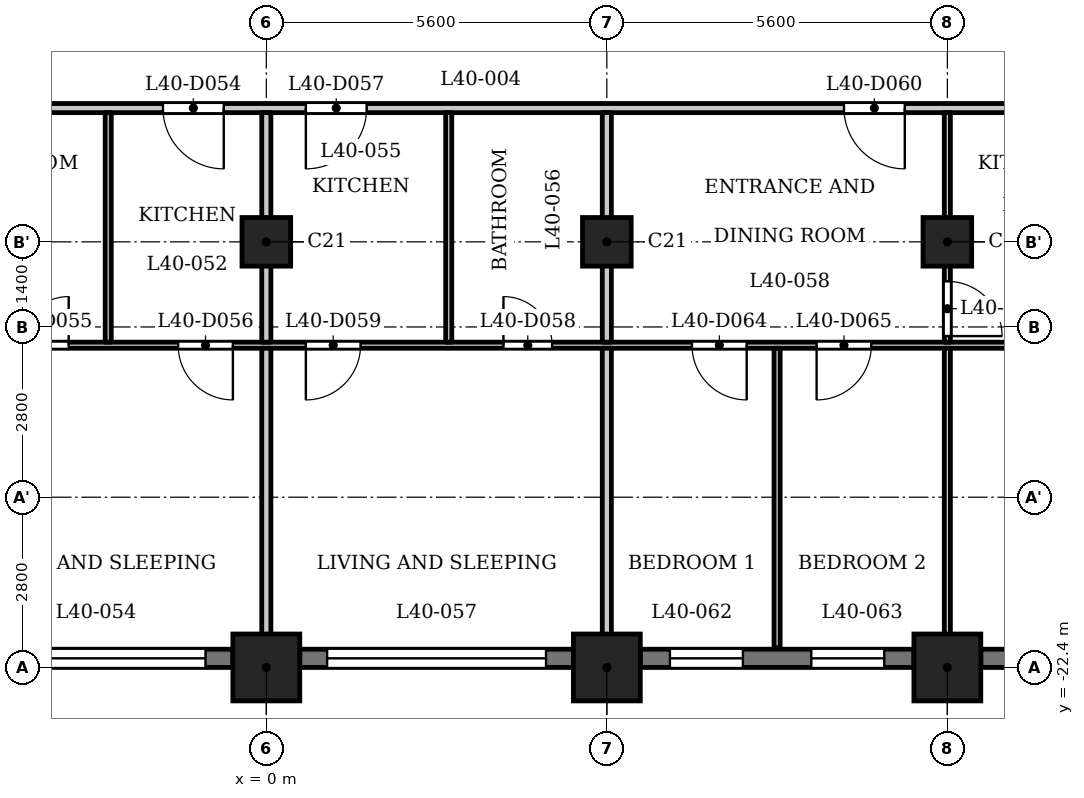
"""IFC4 building model, lengths in metres.
Left out: names, types, materials, properties, quantities, classifications, styles, units other than length and angle.
Written with IfcOpenShell. Run it as: python <this file> out.ifc"""

import sys

from ifc_helpers import new_model, si_unit, direction, frame, frame_2d, origin, origin_2d, place, context, subcontext, project, spatial, rectangle, extrude, element, fill, save


model = new_model("IFC4")
c1 = context("Model", 3, precision=1e-05, world=origin(), true_north=direction((0.0, 1.0)))
c2 = subcontext(c1, "Body", "Model", "MODEL_VIEW")
j1 = project(units=[si_unit("LENGTHUNIT", "METRE"), si_unit("PLANEANGLEUNIT", "RADIAN")], contexts=[c1])
p1 = place(None, origin())
s1 = spatial("IfcSite", under=j1, at=p1, CompositionType="ELEMENT")
p2 = place(p1, origin())
s2 = spatial("IfcBuilding", under=s1, at=p2, CompositionType="ELEMENT")
p3 = place(p2, frame((0.0, 0.0, 157.1)))
s3 = spatial("IfcBuildingStorey", under=s2, at=p3, CompositionType="ELEMENT", Elevation=157.1)
for number, where, z_axis, x_axis in (
    (1, (0.0, -22.4, 0.0), (0.0, 0.0, 1.0), (1.0, 0.0, 0.0)),
    (2, (5.6, -22.4, 0.0), (0.0, 0.0, 1.0), (1.0, 0.0, 0.0)),
    (3, (11.2, -22.4, 0.0), (0.0, 0.0, 1.0), (1.0, 0.0, 0.0)),
):
    element("IfcColumn", number, at=place(p3, frame(where, z_axis=z_axis, x_axis=x_axis)), inside=s3, PredefinedType="COLUMN", context=c2, shape_type="SweptSolid", body=[
        extrude(rectangle(XDim=1.1, YDim=1.1, at=origin_2d()), origin(), (0.0, 0.0, 1.0), 3.5),
    ])
for number, where, z_axis, x_axis in (
    (4, (0.0, -15.4, 0.0), (0.0, 0.0, 1.0), (1.0, 0.0, 0.0)),
    (5, (5.6, -15.4, 0.0), (0.0, 0.0, 1.0), (1.0, 0.0, 0.0)),
    (6, (11.2, -15.4, 0.0), (0.0, 0.0, 1.0), (1.0, 0.0, 0.0)),
):
    element("IfcColumn", number, at=place(p3, frame(where, z_axis=z_axis, x_axis=x_axis)), inside=s3, PredefinedType="COLUMN", context=c2, shape_type="SweptSolid", body=[
        extrude(rectangle(XDim=0.8, YDim=0.8, at=origin_2d()), origin(), (0.0, 0.0, 1.0), 3.5),
    ])
p4 = place(p3, frame((-5.05, -22.25, 0.0), z_axis=(0.0, 0.0, 1.0), x_axis=(1.0, 0.0, 0.0)))
e7 = element("IfcWall", 7, at=p4, inside=s3, PredefinedType="SOLIDWALL", context=c2, shape_type="SweptSolid", body=[
    extrude(rectangle(XDim=4.5, YDim=0.3, at=frame_2d((2.25, 0.0))), origin(), (0.0, 0.0, 1.0), 2.45),
])
p5 = place(p4, frame((0.45, 0.0, 1.2)))
e8 = element("IfcOpeningElement", 8, at=p5, cuts=e7, PredefinedType="OPENING", context=c2, shape_type="SweptSolid", body=[
    extrude(rectangle(XDim=3.6, YDim=0.95, at=frame_2d((1.8, 0.475))), frame((0.0, 0.16, 0.0), z_axis=(0.0, -1.0, 0.0), x_axis=(1.0, 0.0, 0.0)), (0.0, 0.0, 1.0), 0.32),
])
p6 = place(p3, frame((0.55, -22.25, 0.0), z_axis=(0.0, 0.0, 1.0), x_axis=(1.0, 0.0, 0.0)))
e9 = element("IfcWall", 9, at=p6, inside=s3, PredefinedType="SOLIDWALL", context=c2, shape_type="SweptSolid", body=[
    extrude(rectangle(XDim=4.5, YDim=0.3, at=frame_2d((2.25, 0.0))), origin(), (0.0, 0.0, 1.0), 2.45),
])
p7 = place(p6, frame((0.45, 0.0, 1.2)))
e10 = element("IfcOpeningElement", 10, at=p7, cuts=e9, PredefinedType="OPENING", context=c2, shape_type="SweptSolid", body=[
    extrude(rectangle(XDim=3.6, YDim=0.95, at=frame_2d((1.8, 0.475))), frame((0.0, 0.16, 0.0), z_axis=(0.0, -1.0, 0.0), x_axis=(1.0, 0.0, 0.0)), (0.0, 0.0, 1.0), 0.32),
])
p8 = place(p3, frame((6.15, -22.25, 0.0), z_axis=(0.0, 0.0, 1.0), x_axis=(1.0, 0.0, 0.0)))
e11 = element("IfcWall", 11, at=p8, inside=s3, PredefinedType="SOLIDWALL", context=c2, shape_type="SweptSolid", body=[
    extrude(rectangle(XDim=4.5, YDim=0.3, at=frame_2d((2.25, 0.0))), origin(), (0.0, 0.0, 1.0), 2.45),
])
p9 = place(p8, frame((0.488, 0.0, 0.6)))
e12 = element("IfcOpeningElement", 12, at=p9, cuts=e11, PredefinedType="OPENING", context=c2, shape_type="SweptSolid", body=[
    extrude(rectangle(XDim=1.2, YDim=1.55, at=frame_2d((0.6, 0.775))), frame((0.0, 0.16, 0.0), z_axis=(0.0, -1.0, 0.0), x_axis=(1.0, 0.0, 0.0)), (0.0, 0.0, 1.0), 0.32),
])
p10 = place(p8, frame((2.812, 0.0, 0.6)))
e13 = element("IfcOpeningElement", 13, at=p10, cuts=e11, PredefinedType="OPENING", context=c2, shape_type="SweptSolid", body=[
    extrude(rectangle(XDim=1.2, YDim=1.55, at=frame_2d((0.6, 0.775))), frame((0.0, 0.16, 0.0), z_axis=(0.0, -1.0, 0.0), x_axis=(1.0, 0.0, 0.0)), (0.0, 0.0, 1.0), 0.32),
])
p11 = place(p3, frame((11.75, -22.25, 0.0), z_axis=(0.0, 0.0, 1.0), x_axis=(1.0, 0.0, 0.0)))
e14 = element("IfcWall", 14, at=p11, inside=s3, PredefinedType="SOLIDWALL", context=c2, shape_type="SweptSolid", body=[
    extrude(rectangle(XDim=4.5, YDim=0.3, at=frame_2d((2.25, 0.0))), origin(), (0.0, 0.0, 1.0), 2.45),
])
p12 = place(p11, frame((0.45, 0.0, 1.2)))
e15 = element("IfcOpeningElement", 15, at=p12, cuts=e14, PredefinedType="OPENING", context=c2, shape_type="SweptSolid", body=[
    extrude(rectangle(XDim=3.6, YDim=0.95, at=frame_2d((1.8, 0.475))), frame((0.0, 0.16, 0.0), z_axis=(0.0, -1.0, 0.0), x_axis=(1.0, 0.0, 0.0)), (0.0, 0.0, 1.0), 0.32),
])
p13 = place(p3, frame((-16.725, -17.1, 0.0), z_axis=(0.0, 0.0, 1.0), x_axis=(1.0, 0.0, 0.0)))
e16 = element("IfcWall", 16, at=p13, inside=s3, PredefinedType="PARTITIONING", context=c2, shape_type="SweptSolid", body=[
    extrude(rectangle(XDim=33.45, YDim=0.1, at=frame_2d((16.725, 0.0))), origin(), (0.0, 0.0, 1.0), 3.2),
])
p14 = place(p13, frame((0.725, 0.0, 0.0)))
e17 = element("IfcOpeningElement", 17, at=p14, cuts=e16, PredefinedType="OPENING", context=c2, shape_type="SweptSolid", body=[
    extrude(rectangle(XDim=0.8, YDim=2.1, at=frame_2d((0.4, 1.05))), frame((0.0, 0.06, 0.0), z_axis=(0.0, -1.0, 0.0), x_axis=(1.0, 0.0, 0.0)), (0.0, 0.0, 1.0), 0.12),
])
p15 = place(p13, frame((3.175, 0.0, 0.0)))
e18 = element("IfcOpeningElement", 18, at=p15, cuts=e16, PredefinedType="OPENING", context=c2, shape_type="SweptSolid", body=[
    extrude(rectangle(XDim=0.9, YDim=2.1, at=frame_2d((0.45, 1.05))), frame((0.0, 0.06, 0.0), z_axis=(0.0, -1.0, 0.0), x_axis=(1.0, 0.0, 0.0)), (0.0, 0.0, 1.0), 0.12),
])
p16 = place(p13, frame((6.075, 0.0, 0.0)))
e19 = element("IfcOpeningElement", 19, at=p16, cuts=e16, PredefinedType="OPENING", context=c2, shape_type="SweptSolid", body=[
    extrude(rectangle(XDim=0.8, YDim=2.1, at=frame_2d((0.4, 1.05))), frame((0.0, 0.06, 0.0), z_axis=(0.0, -1.0, 0.0), x_axis=(1.0, 0.0, 0.0)), (0.0, 0.0, 1.0), 0.12),
])
p17 = place(p13, frame((9.425, 0.0, 0.0)))
e20 = element("IfcOpeningElement", 20, at=p17, cuts=e16, PredefinedType="OPENING", context=c2, shape_type="SweptSolid", body=[
    extrude(rectangle(XDim=0.9, YDim=2.1, at=frame_2d((0.45, 1.05))), frame((0.0, 0.06, 0.0), z_axis=(0.0, -1.0, 0.0), x_axis=(1.0, 0.0, 0.0)), (0.0, 0.0, 1.0), 0.12),
])
p18 = place(p13, frame((12.675, 0.0, 0.0)))
e21 = element("IfcOpeningElement", 21, at=p18, cuts=e16, PredefinedType="OPENING", context=c2, shape_type="SweptSolid", body=[
    extrude(rectangle(XDim=0.8, YDim=2.1, at=frame_2d((0.4, 1.05))), frame((0.0, 0.06, 0.0), z_axis=(0.0, -1.0, 0.0), x_axis=(1.0, 0.0, 0.0)), (0.0, 0.0, 1.0), 0.12),
])
p19 = place(p13, frame((15.275, 0.0, 0.0)))
e22 = element("IfcOpeningElement", 22, at=p19, cuts=e16, PredefinedType="OPENING", context=c2, shape_type="SweptSolid", body=[
    extrude(rectangle(XDim=0.9, YDim=2.1, at=frame_2d((0.45, 1.05))), frame((0.0, 0.06, 0.0), z_axis=(0.0, -1.0, 0.0), x_axis=(1.0, 0.0, 0.0)), (0.0, 0.0, 1.0), 0.12),
])
p20 = place(p13, frame((20.625, 0.0, 0.0)))
e23 = element("IfcOpeningElement", 23, at=p20, cuts=e16, PredefinedType="OPENING", context=c2, shape_type="SweptSolid", body=[
    extrude(rectangle(XDim=0.8, YDim=2.1, at=frame_2d((0.4, 1.05))), frame((0.0, 0.06, 0.0), z_axis=(0.0, -1.0, 0.0), x_axis=(1.0, 0.0, 0.0)), (0.0, 0.0, 1.0), 0.12),
])
p21 = place(p13, frame((17.375, 0.0, 0.0)))
e24 = element("IfcOpeningElement", 24, at=p21, cuts=e16, PredefinedType="OPENING", context=c2, shape_type="SweptSolid", body=[
    extrude(rectangle(XDim=0.9, YDim=2.1, at=frame_2d((0.45, 1.05))), frame((0.0, 0.06, 0.0), z_axis=(0.0, -1.0, 0.0), x_axis=(1.0, 0.0, 0.0)), (0.0, 0.0, 1.0), 0.12),
])
p22 = place(p13, frame((31.075, 0.0, 0.0)))
e25 = element("IfcOpeningElement", 25, at=p22, cuts=e16, PredefinedType="OPENING", context=c2, shape_type="SweptSolid", body=[
    extrude(rectangle(XDim=0.8, YDim=2.1, at=frame_2d((0.4, 1.05))), frame((0.0, 0.06, 0.0), z_axis=(0.0, -1.0, 0.0), x_axis=(1.0, 0.0, 0.0)), (0.0, 0.0, 1.0), 0.12),
])
p23 = place(p13, frame((29.325, 0.0, 0.0)))
e26 = element("IfcOpeningElement", 26, at=p23, cuts=e16, PredefinedType="OPENING", context=c2, shape_type="SweptSolid", body=[
    extrude(rectangle(XDim=0.9, YDim=2.1, at=frame_2d((0.45, 1.05))), frame((0.0, 0.06, 0.0), z_axis=(0.0, -1.0, 0.0), x_axis=(1.0, 0.0, 0.0)), (0.0, 0.0, 1.0), 0.12),
])
p24 = place(p13, frame((23.725, 0.0, 0.0)))
e27 = element("IfcOpeningElement", 27, at=p24, cuts=e16, PredefinedType="OPENING", context=c2, shape_type="SweptSolid", body=[
    extrude(rectangle(XDim=0.9, YDim=2.1, at=frame_2d((0.45, 1.05))), frame((0.0, 0.06, 0.0), z_axis=(0.0, -1.0, 0.0), x_axis=(1.0, 0.0, 0.0)), (0.0, 0.0, 1.0), 0.12),
])
p25 = place(p13, frame((25.775, 0.0, 0.0)))
e28 = element("IfcOpeningElement", 28, at=p25, cuts=e16, PredefinedType="OPENING", context=c2, shape_type="SweptSolid", body=[
    extrude(rectangle(XDim=0.9, YDim=2.1, at=frame_2d((0.45, 1.05))), frame((0.0, 0.06, 0.0), z_axis=(0.0, -1.0, 0.0), x_axis=(1.0, 0.0, 0.0)), (0.0, 0.0, 1.0), 0.12),
])
p26 = place(p3, frame((-17.4, -13.2, 0.0), z_axis=(0.0, 0.0, 1.0), x_axis=(1.0, 0.0, 0.0)))
e29 = element("IfcWall", 29, at=p26, inside=s3, PredefinedType="PARTITIONING", context=c2, shape_type="SweptSolid", body=[
    extrude(rectangle(XDim=34.8, YDim=0.15, at=frame_2d((17.4, 0.0))), origin(), (0.0, 0.0, 1.0), 3.2),
])
p27 = place(p26, frame((0.15, 0.0, 0.0)))
e30 = element("IfcOpeningElement", 30, at=p27, cuts=e29, PredefinedType="OPENING", context=c2, shape_type="SweptSolid", body=[
    extrude(rectangle(XDim=1.0, YDim=2.1, at=frame_2d((0.5, 1.05))), frame((0.0, 0.085, 0.0), z_axis=(0.0, -1.0, 0.0), x_axis=(1.0, 0.0, 0.0)), (0.0, 0.0, 1.0), 0.17),
])
p28 = place(p26, frame((33.55, 0.0, 0.0)))
e31 = element("IfcOpeningElement", 31, at=p28, cuts=e29, PredefinedType="OPENING", context=c2, shape_type="SweptSolid", body=[
    extrude(rectangle(XDim=1.0, YDim=2.1, at=frame_2d((0.5, 1.05))), frame((0.0, 0.085, 0.0), z_axis=(0.0, -1.0, 0.0), x_axis=(1.0, 0.0, 0.0)), (0.0, 0.0, 1.0), 0.17),
])
p29 = place(p26, frame((3.5, 0.0, 0.0)))
e32 = element("IfcOpeningElement", 32, at=p29, cuts=e29, PredefinedType="OPENING", context=c2, shape_type="SweptSolid", body=[
    extrude(rectangle(XDim=1.0, YDim=2.1, at=frame_2d((0.5, 1.05))), frame((0.0, 0.085, 0.0), z_axis=(0.0, -1.0, 0.0), x_axis=(1.0, 0.0, 0.0)), (0.0, 0.0, 1.0), 0.17),
])
p30 = place(p26, frame((10.1, 0.0, 0.0)))
e33 = element("IfcOpeningElement", 33, at=p30, cuts=e29, PredefinedType="OPENING", context=c2, shape_type="SweptSolid", body=[
    extrude(rectangle(XDim=1.0, YDim=2.1, at=frame_2d((0.5, 1.05))), frame((0.0, 0.085, 0.0), z_axis=(0.0, -1.0, 0.0), x_axis=(1.0, 0.0, 0.0)), (0.0, 0.0, 1.0), 0.17),
])
p31 = place(p26, frame((15.7, 0.0, 0.0)))
e34 = element("IfcOpeningElement", 34, at=p31, cuts=e29, PredefinedType="OPENING", context=c2, shape_type="SweptSolid", body=[
    extrude(rectangle(XDim=1.0, YDim=2.1, at=frame_2d((0.5, 1.05))), frame((0.0, 0.085, 0.0), z_axis=(0.0, -1.0, 0.0), x_axis=(1.0, 0.0, 0.0)), (0.0, 0.0, 1.0), 0.17),
])
p32 = place(p26, frame((18.05, 0.0, 0.0)))
e35 = element("IfcOpeningElement", 35, at=p32, cuts=e29, PredefinedType="OPENING", context=c2, shape_type="SweptSolid", body=[
    extrude(rectangle(XDim=1.0, YDim=2.1, at=frame_2d((0.5, 1.05))), frame((0.0, 0.085, 0.0), z_axis=(0.0, -1.0, 0.0), x_axis=(1.0, 0.0, 0.0)), (0.0, 0.0, 1.0), 0.17),
])
p33 = place(p26, frame((26.9, 0.0, 0.0)))
e36 = element("IfcOpeningElement", 36, at=p33, cuts=e29, PredefinedType="OPENING", context=c2, shape_type="SweptSolid", body=[
    extrude(rectangle(XDim=1.0, YDim=2.1, at=frame_2d((0.5, 1.05))), frame((0.0, 0.085, 0.0), z_axis=(0.0, -1.0, 0.0), x_axis=(1.0, 0.0, 0.0)), (0.0, 0.0, 1.0), 0.17),
])
p34 = place(p3, frame((-2.6, -17.05, 0.0), z_axis=(0.0, 0.0, 1.0), x_axis=(0.0, 1.0, 0.0)))
e37 = element("IfcWall", 37, at=p34, inside=s3, PredefinedType="PARTITIONING", context=c2, shape_type="SweptSolid", body=[
    extrude(rectangle(XDim=3.775, YDim=0.1, at=frame_2d((1.888, 0.0))), origin(), (0.0, 0.0, 1.0), 3.2),
])
p35 = place(p3, frame((0.0, -22.93, 0.0), z_axis=(0.0, 0.0, 1.0), x_axis=(0.0, 1.0, 0.0)))
e38 = element("IfcWall", 38, at=p35, inside=s3, PredefinedType="PARTITIONING", context=c2, shape_type="SweptSolid", body=[
    extrude(rectangle(XDim=5.78, YDim=0.15, at=frame_2d((2.89, 0.0))), origin(), (0.0, 0.0, 1.0), 3.2),
])
p36 = place(p3, frame((0.0, -17.05, 0.0), z_axis=(0.0, 0.0, 1.0), x_axis=(0.0, 1.0, 0.0)))
e39 = element("IfcWall", 39, at=p36, inside=s3, PredefinedType="PARTITIONING", context=c2, shape_type="SweptSolid", body=[
    extrude(rectangle(XDim=3.775, YDim=0.15, at=frame_2d((1.888, 0.0))), origin(), (0.0, 0.0, 1.0), 3.2),
])
p37 = place(p3, frame((3.0, -17.05, 0.0), z_axis=(0.0, 0.0, 1.0), x_axis=(0.0, 1.0, 0.0)))
e40 = element("IfcWall", 40, at=p37, inside=s3, PredefinedType="PARTITIONING", context=c2, shape_type="SweptSolid", body=[
    extrude(rectangle(XDim=3.775, YDim=0.1, at=frame_2d((1.888, 0.0))), origin(), (0.0, 0.0, 1.0), 3.2),
])
p38 = place(p3, frame((5.6, -22.93, 0.0), z_axis=(0.0, 0.0, 1.0), x_axis=(0.0, 1.0, 0.0)))
e41 = element("IfcWall", 41, at=p38, inside=s3, PredefinedType="PARTITIONING", context=c2, shape_type="SweptSolid", body=[
    extrude(rectangle(XDim=5.78, YDim=0.15, at=frame_2d((2.89, 0.0))), origin(), (0.0, 0.0, 1.0), 3.2),
])
p39 = place(p3, frame((5.6, -17.05, 0.0), z_axis=(0.0, 0.0, 1.0), x_axis=(0.0, 1.0, 0.0)))
e42 = element("IfcWall", 42, at=p39, inside=s3, PredefinedType="PARTITIONING", context=c2, shape_type="SweptSolid", body=[
    extrude(rectangle(XDim=3.775, YDim=0.15, at=frame_2d((1.888, 0.0))), origin(), (0.0, 0.0, 1.0), 3.2),
])
p40 = place(p3, frame((8.4, -22.08, 0.0), z_axis=(0.0, 0.0, 1.0), x_axis=(0.0, 1.0, 0.0)))
e43 = element("IfcWall", 43, at=p40, inside=s3, PredefinedType="PARTITIONING", context=c2, shape_type="SweptSolid", body=[
    extrude(rectangle(XDim=4.93, YDim=0.1, at=frame_2d((2.465, 0.0))), origin(), (0.0, 0.0, 1.0), 3.2),
])
p41 = place(p3, frame((11.2, -22.93, 0.0), z_axis=(0.0, 0.0, 1.0), x_axis=(0.0, 1.0, 0.0)))
e44 = element("IfcWall", 44, at=p41, inside=s3, PredefinedType="PARTITIONING", context=c2, shape_type="SweptSolid", body=[
    extrude(rectangle(XDim=5.78, YDim=0.1, at=frame_2d((2.89, 0.0))), origin(), (0.0, 0.0, 1.0), 3.2),
])
p42 = place(p3, frame((11.2, -17.05, 0.0), z_axis=(0.0, 0.0, 1.0), x_axis=(0.0, 1.0, 0.0)))
e45 = element("IfcWall", 45, at=p42, inside=s3, PredefinedType="PARTITIONING", context=c2, shape_type="SweptSolid", body=[
    extrude(rectangle(XDim=3.775, YDim=0.1, at=frame_2d((1.888, 0.0))), origin(), (0.0, 0.0, 1.0), 3.2),
])
p43 = place(p42, frame((0.1, 0.0, 0.0)))
e46 = element("IfcOpeningElement", 46, at=p43, cuts=e45, PredefinedType="OPENING", context=c2, shape_type="SweptSolid", body=[
    extrude(rectangle(XDim=0.9, YDim=2.1, at=frame_2d((0.45, 1.05))), frame((0.0, 0.06, 0.0), z_axis=(0.0, -1.0, 0.0), x_axis=(1.0, 0.0, 0.0)), (0.0, 0.0, 1.0), 0.12),
])
p44 = place(p31, origin())
e47 = element("IfcDoor", 47, at=p44, inside=s3, OperationType="SINGLE_SWING_RIGHT", PredefinedType="DOOR", context=c2, shape_type="SweptSolid", body=[
    extrude(rectangle(XDim=1.0, YDim=2.1, at=frame_2d((0.5, 1.05))), frame((0.0, 0.025, 0.0), z_axis=(0.0, -1.0, 0.0), x_axis=(1.0, 0.0, 0.0)), (0.0, 0.0, 1.0), 0.05),
])
fill(e34, e47)
p45 = place(p18, origin())
e48 = element("IfcDoor", 48, at=p45, inside=s3, OperationType="SINGLE_SWING_LEFT", PredefinedType="DOOR", context=c2, shape_type="SweptSolid", body=[
    extrude(rectangle(XDim=0.8, YDim=2.1, at=frame_2d((0.4, 1.05))), frame((0.0, 0.025, 0.0), z_axis=(0.0, -1.0, 0.0), x_axis=(1.0, 0.0, 0.0)), (0.0, 0.0, 1.0), 0.05),
])
fill(e21, e48)
p46 = place(p19, origin())
e49 = element("IfcDoor", 49, at=p46, inside=s3, OperationType="SINGLE_SWING_RIGHT", PredefinedType="DOOR", context=c2, shape_type="SweptSolid", body=[
    extrude(rectangle(XDim=0.9, YDim=2.1, at=frame_2d((0.45, 1.05))), frame((0.0, 0.025, 0.0), z_axis=(0.0, -1.0, 0.0), x_axis=(1.0, 0.0, 0.0)), (0.0, 0.0, 1.0), 0.05),
])
fill(e22, e49)
p47 = place(p32, origin())
e50 = element("IfcDoor", 50, at=p47, inside=s3, OperationType="SINGLE_SWING_LEFT", PredefinedType="DOOR", context=c2, shape_type="SweptSolid", body=[
    extrude(rectangle(XDim=1.0, YDim=2.1, at=frame_2d((0.5, 1.05))), frame((0.0, 0.025, 0.0), z_axis=(0.0, -1.0, 0.0), x_axis=(1.0, 0.0, 0.0)), (0.0, 0.0, 1.0), 0.05),
])
fill(e35, e50)
p48 = place(p20, origin())
e51 = element("IfcDoor", 51, at=p48, inside=s3, OperationType="SINGLE_SWING_RIGHT", PredefinedType="DOOR", context=c2, shape_type="SweptSolid", body=[
    extrude(rectangle(XDim=0.8, YDim=2.1, at=frame_2d((0.4, 1.05))), frame((0.0, 0.025, 0.0), z_axis=(0.0, -1.0, 0.0), x_axis=(1.0, 0.0, 0.0)), (0.0, 0.0, 1.0), 0.05),
])
fill(e23, e51)
p49 = place(p21, origin())
e52 = element("IfcDoor", 52, at=p49, inside=s3, OperationType="SINGLE_SWING_LEFT", PredefinedType="DOOR", context=c2, shape_type="SweptSolid", body=[
    extrude(rectangle(XDim=0.9, YDim=2.1, at=frame_2d((0.45, 1.05))), frame((0.0, 0.025, 0.0), z_axis=(0.0, -1.0, 0.0), x_axis=(1.0, 0.0, 0.0)), (0.0, 0.0, 1.0), 0.05),
])
fill(e24, e52)
p50 = place(p33, origin())
e53 = element("IfcDoor", 53, at=p50, inside=s3, OperationType="SINGLE_SWING_RIGHT", PredefinedType="DOOR", context=c2, shape_type="SweptSolid", body=[
    extrude(rectangle(XDim=1.0, YDim=2.1, at=frame_2d((0.5, 1.05))), frame((0.0, 0.025, 0.0), z_axis=(0.0, -1.0, 0.0), x_axis=(1.0, 0.0, 0.0)), (0.0, 0.0, 1.0), 0.05),
])
fill(e36, e53)
p51 = place(p43, origin())
e54 = element("IfcDoor", 54, at=p51, inside=s3, OperationType="SINGLE_SWING_LEFT", PredefinedType="DOOR", context=c2, shape_type="SweptSolid", body=[
    extrude(rectangle(XDim=0.9, YDim=2.1, at=frame_2d((0.45, 1.05))), frame((0.0, 0.025, 0.0), z_axis=(0.0, -1.0, 0.0), x_axis=(1.0, 0.0, 0.0)), (0.0, 0.0, 1.0), 0.05),
])
fill(e46, e54)
p52 = place(p24, origin())
e55 = element("IfcDoor", 55, at=p52, inside=s3, OperationType="SINGLE_SWING_RIGHT", PredefinedType="DOOR", context=c2, shape_type="SweptSolid", body=[
    extrude(rectangle(XDim=0.9, YDim=2.1, at=frame_2d((0.45, 1.05))), frame((0.0, 0.025, 0.0), z_axis=(0.0, -1.0, 0.0), x_axis=(1.0, 0.0, 0.0)), (0.0, 0.0, 1.0), 0.05),
])
fill(e27, e55)
p53 = place(p25, origin())
e56 = element("IfcDoor", 56, at=p53, inside=s3, OperationType="SINGLE_SWING_LEFT", PredefinedType="DOOR", context=c2, shape_type="SweptSolid", body=[
    extrude(rectangle(XDim=0.9, YDim=2.1, at=frame_2d((0.45, 1.05))), frame((0.0, 0.025, 0.0), z_axis=(0.0, -1.0, 0.0), x_axis=(1.0, 0.0, 0.0)), (0.0, 0.0, 1.0), 0.05),
])
fill(e28, e56)
p54 = place(p5, origin())
e57 = element("IfcWindow", 57, at=p54, inside=s3, PartitioningType="SINGLE_PANEL", PredefinedType="WINDOW", context=c2, shape_type="SweptSolid", body=[
    extrude(rectangle(XDim=3.6, YDim=0.95, at=frame_2d((1.8, 0.475))), frame((0.0, 0.03, 0.0), z_axis=(0.0, -1.0, 0.0), x_axis=(1.0, 0.0, 0.0)), (0.0, 0.0, 1.0), 0.06),
])
fill(e8, e57)
p55 = place(p7, origin())
e58 = element("IfcWindow", 58, at=p55, inside=s3, PartitioningType="SINGLE_PANEL", PredefinedType="WINDOW", context=c2, shape_type="SweptSolid", body=[
    extrude(rectangle(XDim=3.6, YDim=0.95, at=frame_2d((1.8, 0.475))), frame((0.0, 0.03, 0.0), z_axis=(0.0, -1.0, 0.0), x_axis=(1.0, 0.0, 0.0)), (0.0, 0.0, 1.0), 0.06),
])
fill(e10, e58)
p56 = place(p9, origin())
e59 = element("IfcWindow", 59, at=p56, inside=s3, PartitioningType="SINGLE_PANEL", PredefinedType="WINDOW", context=c2, shape_type="SweptSolid", body=[
    extrude(rectangle(XDim=1.2, YDim=1.55, at=frame_2d((0.6, 0.775))), frame((0.0, 0.03, 0.0), z_axis=(0.0, -1.0, 0.0), x_axis=(1.0, 0.0, 0.0)), (0.0, 0.0, 1.0), 0.06),
])
fill(e12, e59)
p57 = place(p10, origin())
e60 = element("IfcWindow", 60, at=p57, inside=s3, PartitioningType="SINGLE_PANEL", PredefinedType="WINDOW", context=c2, shape_type="SweptSolid", body=[
    extrude(rectangle(XDim=1.2, YDim=1.55, at=frame_2d((0.6, 0.775))), frame((0.0, 0.03, 0.0), z_axis=(0.0, -1.0, 0.0), x_axis=(1.0, 0.0, 0.0)), (0.0, 0.0, 1.0), 0.06),
])
fill(e13, e60)
save(model, sys.argv[1])
